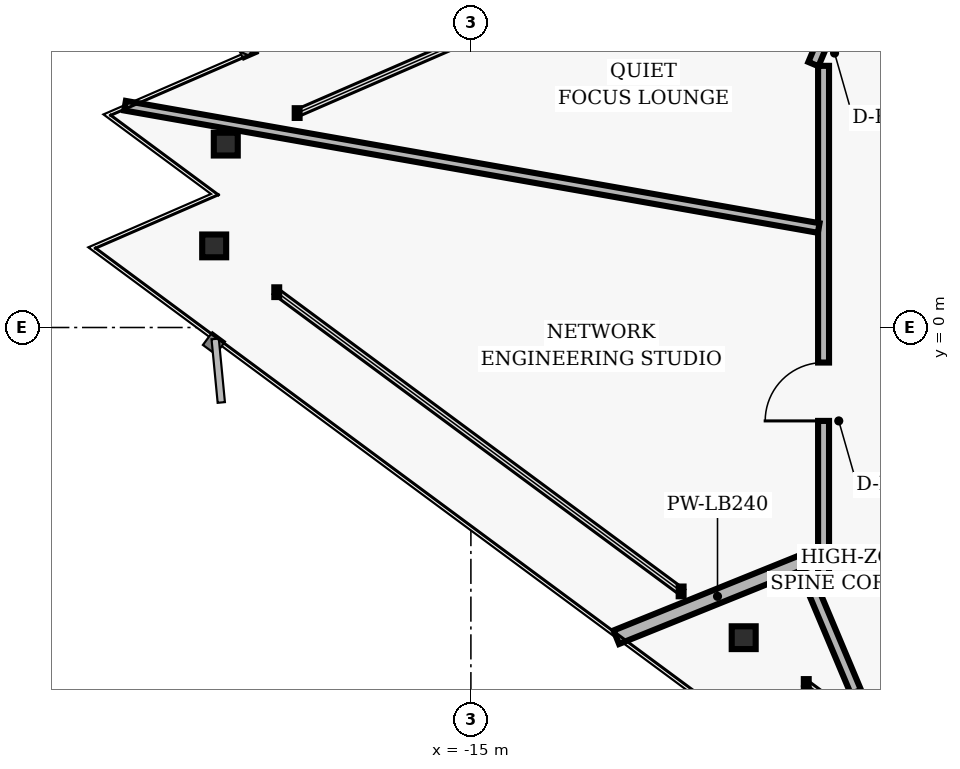
"""IFC4 building model, lengths in metres.
Left out: names, types, materials, properties, quantities, classifications, styles, units other than length and angle.
Written with IfcOpenShell. Run it as: python <this file> out.ifc"""

import sys

from ifc_helpers import new_model, si_unit, direction, frame, frame_2d, origin, origin_2d, place, context, subcontext, project, spatial, rectangle, i_section, extrude, element, fill, save


model = new_model("IFC4")
c1 = context("Model", 3, precision=1e-05, world=origin(), true_north=direction((0.0, 1.0)))
c2 = subcontext(c1, "Body", "Model", "MODEL_VIEW")
j1 = project(units=[si_unit("LENGTHUNIT", "METRE"), si_unit("PLANEANGLEUNIT", "RADIAN")], contexts=[c1])
p1 = place(None, origin())
s1 = spatial("IfcSite", under=j1, at=p1, CompositionType="ELEMENT")
p2 = place(p1, origin())
s2 = spatial("IfcBuilding", under=s1, at=p2, CompositionType="ELEMENT")
p3 = place(p2, frame((0.0, 0.0, 220.96)))
s3 = spatial("IfcBuildingStorey", under=s2, at=p3, CompositionType="ELEMENT", Elevation=220.96)
for number, where, z_axis, x_axis in (
    (1, (-19.031, 3.016, 0.0), (0.0, 0.0, 1.0), (1.0, 0.0, 0.0)),
    (2, (-19.222, 1.342, 0.0), (0.0, 0.0, 1.0), (1.0, 0.0, 0.0)),
    (3, (-10.513, -5.102, 0.0), (0.0, 0.0, 1.0), (1.0, 0.0, 0.0)),
):
    element("IfcColumn", number, at=place(p3, frame(where, z_axis=z_axis, x_axis=x_axis)), inside=s3, PredefinedType="COLUMN", context=c2, shape_type="SweptSolid", body=[
        extrude(i_section(OverallWidth=0.394, OverallDepth=0.375, WebThickness=0.017, FlangeThickness=0.028, FilletRadius=0.016, at=origin_2d()), origin(), (0.0, 0.0, 1.0), 3.04),
    ])
p4 = place(p3, frame((-7.574, -8.596, 0.0), z_axis=(0.0, 0.0, 1.0), x_axis=(-0.38757793583, 0.921836939842, 0.0)))
e4 = element("IfcWall", 4, at=p4, inside=s3, PredefinedType="PARTITIONING", context=c2, shape_type="SweptSolid", body=[
    extrude(rectangle(XDim=4.625, YDim=0.18, at=frame_2d((2.313, 0.0))), origin(), (0.0, 0.0, 1.0), 2.773),
])
p5 = place(p4, frame((1.803, 0.0, 0.0)))
e5 = element("IfcOpeningElement", 5, at=p5, cuts=e4, PredefinedType="OPENING", context=c2, shape_type="SweptSolid", body=[
    extrude(rectangle(XDim=1.02, YDim=2.02, at=frame_2d((0.51, 1.01))), frame((0.0, 0.1, 0.0), z_axis=(0.0, -1.0, 0.0), x_axis=(1.0, 0.0, 0.0)), (0.0, 0.0, 1.0), 0.2),
])
p6 = place(p3, frame((-9.2, -4.303, 0.0), z_axis=(0.0, 0.0, 1.0), x_axis=(0.0, 1.0, 0.0)))
e6 = element("IfcWall", 6, at=p6, inside=s3, PredefinedType="PARTITIONING", context=c2, shape_type="SweptSolid", body=[
    extrude(rectangle(XDim=8.607, YDim=0.18, at=frame_2d((4.303, 0.0))), origin(), (0.0, 0.0, 1.0), 2.773),
])
p7 = place(p6, frame((2.767, 0.0, 0.0)))
e7 = element("IfcOpeningElement", 7, at=p7, cuts=e6, PredefinedType="OPENING", context=c2, shape_type="SweptSolid", body=[
    extrude(rectangle(XDim=0.96, YDim=2.02, at=frame_2d((0.48, 1.01))), frame((0.0, 0.1, 0.0), z_axis=(0.0, -1.0, 0.0), x_axis=(1.0, 0.0, 0.0)), (0.0, 0.0, 1.0), 0.2),
])
p8 = place(p3, frame((-9.367, 4.332, 0.0), z_axis=(0.0, 0.0, 1.0), x_axis=(0.387573945081, 0.921838617706, 0.0)))
e8 = element("IfcWall", 8, at=p8, inside=s3, PredefinedType="PARTITIONING", context=c2, shape_type="SweptSolid", body=[
    extrude(rectangle(XDim=4.813, YDim=0.18, at=frame_2d((2.407, 0.0))), origin(), (0.0, 0.0, 1.0), 2.773),
])
p9 = place(p8, frame((0.302, 0.0, 0.0)))
e9 = element("IfcOpeningElement", 9, at=p9, cuts=e8, PredefinedType="OPENING", context=c2, shape_type="SweptSolid", body=[
    extrude(rectangle(XDim=0.96, YDim=2.02, at=frame_2d((0.48, 1.01))), frame((0.0, 0.1, 0.0), z_axis=(0.0, -1.0, 0.0), x_axis=(1.0, 0.0, 0.0)), (0.0, 0.0, 1.0), 0.2),
])
p10 = place(p3, frame((-9.28, -3.75, 0.0), z_axis=(0.0, 0.0, 1.0), x_axis=(-0.927209590074, -0.374542889499, 0.0)))
e10 = element("IfcWall", 10, at=p10, inside=s3, PredefinedType="PARTITIONING", context=c2, shape_type="SweptSolid", body=[
    extrude(rectangle(XDim=3.59, YDim=0.24, at=frame_2d((1.795, 0.0))), origin(), (0.0, 0.0, 1.0), 2.773),
])
p11 = place(p3, frame((-9.28, 1.636, 0.0), z_axis=(0.0, 0.0, 1.0), x_axis=(-0.984805616272, 0.173660295285, 0.0)))
e11 = element("IfcWall", 11, at=p11, inside=s3, PredefinedType="PARTITIONING", context=c2, shape_type="SweptSolid", body=[
    extrude(rectangle(XDim=11.584, YDim=0.16, at=frame_2d((5.792, 0.0))), origin(), (0.0, 0.0, 1.0), 2.253),
])
p12 = place(p7, origin())
e12 = element("IfcDoor", 12, at=p12, inside=s3, OperationType="SINGLE_SWING_LEFT", PredefinedType="DOOR", context=c2, shape_type="SweptSolid", body=[
    extrude(rectangle(XDim=0.96, YDim=2.02, at=frame_2d((0.48, 1.01))), frame((0.0, 0.025, 0.0), z_axis=(0.0, -1.0, 0.0), x_axis=(1.0, 0.0, 0.0)), (0.0, 0.0, 1.0), 0.05),
])
fill(e7, e12)
save(model, sys.argv[1])
